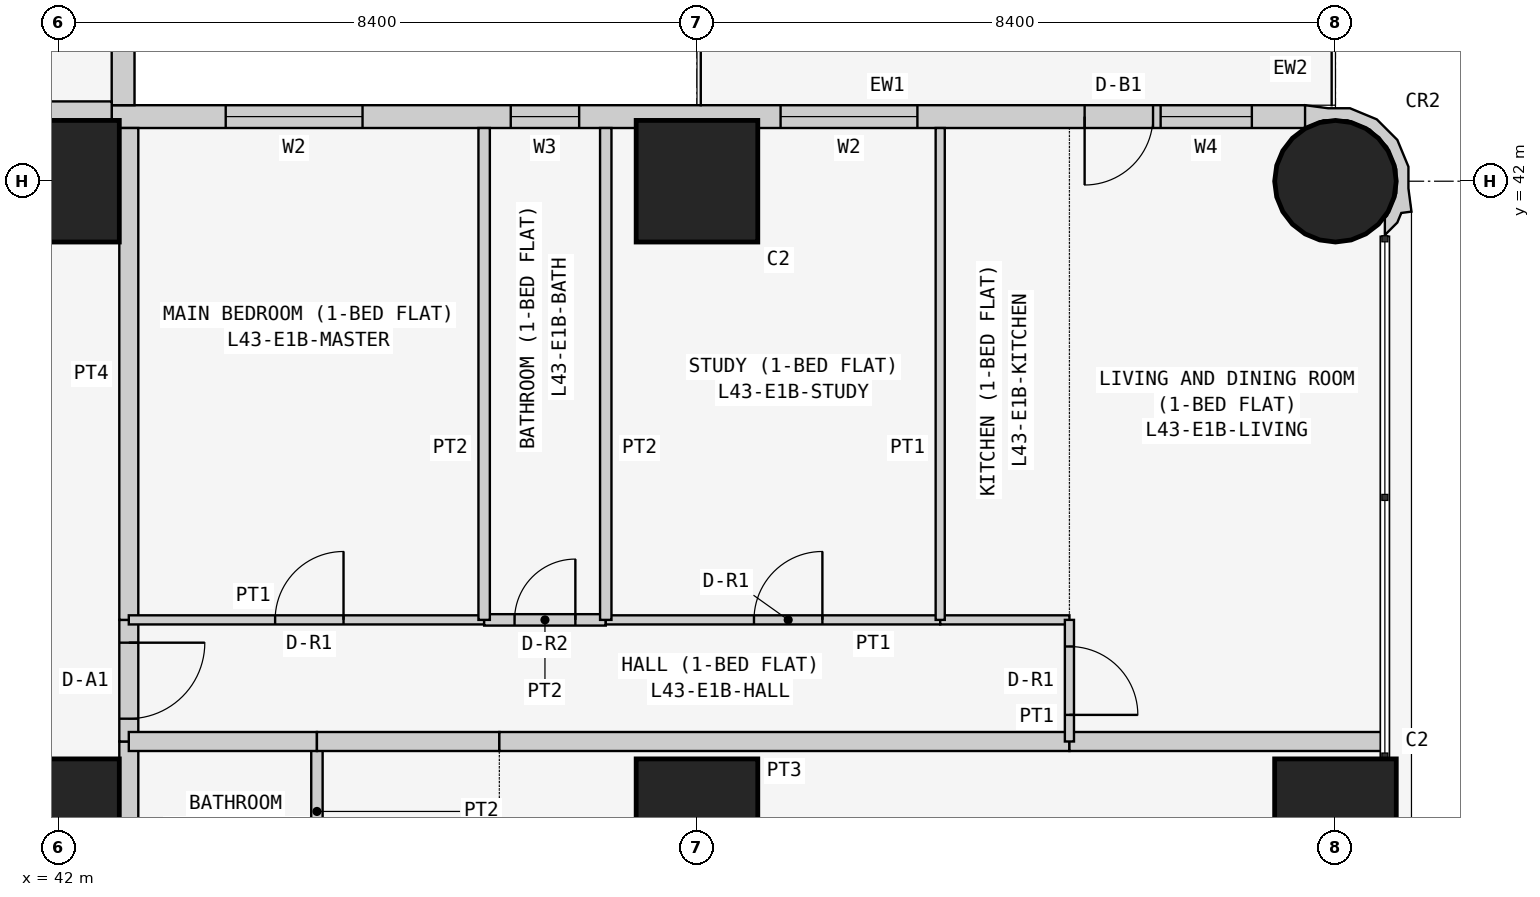
"""IFC4 building model, lengths in metres.
Left out: names, types, materials, properties, quantities, classifications, styles, units other than length and angle.
Written with IfcOpenShell. Run it as: python <this file> out.ifc"""

import sys

from ifc_helpers import new_model, si_unit, direction, frame, frame_2d, origin, origin_2d, place, context, subcontext, project, spatial, polyline, rectangle, circle, outline, extrude, element, fill, save


model = new_model("IFC4")
c1 = context("Model", 3, precision=1e-05, world=origin(), true_north=direction((0.0, 1.0)))
c2 = subcontext(c1, "Body", "Model", "MODEL_VIEW")
j1 = project(units=[si_unit("LENGTHUNIT", "METRE"), si_unit("PLANEANGLEUNIT", "RADIAN")], contexts=[c1])
p1 = place(None, origin())
s1 = spatial("IfcSite", under=j1, at=p1, CompositionType="ELEMENT")
p2 = place(p1, origin())
s2 = spatial("IfcBuilding", under=s1, at=p2, CompositionType="ELEMENT")
p3 = place(p2, frame((0.0, 0.0, 166.5)))
s3 = spatial("IfcBuildingStorey", under=s2, at=p3, CompositionType="ELEMENT", Elevation=166.5)
for number, where, z_axis, x_axis in (
    (1, (42.0, 33.6, 0.0), (0.0, 0.0, 1.0), (1.0, 0.0, 0.0)),
    (2, (42.0, 42.0, 0.0), (0.0, 0.0, 1.0), (1.0, 0.0, 0.0)),
    (3, (50.4, 33.6, 0.0), (0.0, 0.0, 1.0), (1.0, 0.0, 0.0)),
    (4, (50.4, 42.0, 0.0), (0.0, 0.0, 1.0), (1.0, 0.0, 0.0)),
    (5, (58.8, 33.6, 0.0), (0.0, 0.0, 1.0), (1.0, 0.0, 0.0)),
):
    element("IfcColumn", number, at=place(p3, frame(where, z_axis=z_axis, x_axis=x_axis)), inside=s3, PredefinedType="COLUMN", context=c2, shape_type="SweptSolid", body=[
        extrude(rectangle(XDim=1.6, YDim=1.6, at=origin_2d()), origin(), (0.0, 0.0, 1.0), 3.6),
    ])
p4 = place(p3, frame((58.8, 42.0, 0.0), z_axis=(0.0, 0.0, 1.0), x_axis=(1.0, 0.0, 0.0)))
e6 = element("IfcColumn", 6, at=p4, inside=s3, PredefinedType="COLUMN", context=c2, shape_type="SweptSolid", body=[
    extrude(circle(Radius=0.8, at=origin_2d()), origin(), (0.0, 0.0, 1.0), 3.6),
])
p5 = place(p3, frame((58.4, 42.85, 0.0), z_axis=(0.0, 0.0, 1.0), x_axis=(-1.0, 0.0, 0.0)))
e7 = element("IfcWall", 7, at=p5, inside=s3, PredefinedType="SOLIDWALL", context=c2, shape_type="SweptSolid", body=[
    extrude(rectangle(XDim=15.7, YDim=0.3, at=frame_2d((7.85, 0.0))), origin(), (0.0, 0.0, 1.0), 3.45),
])
p6 = place(p5, frame((12.4, 0.0, 0.9)))
e8 = element("IfcOpeningElement", 8, at=p6, cuts=e7, PredefinedType="OPENING", context=c2, shape_type="SweptSolid", body=[
    extrude(rectangle(XDim=1.8, YDim=1.5, at=frame_2d((0.9, 0.75))), frame((0.0, 0.16, 0.0), z_axis=(0.0, -1.0, 0.0), x_axis=(1.0, 0.0, 0.0)), (0.0, 0.0, 1.0), 0.32),
])
p7 = place(p5, frame((9.55, 0.0, 1.5)))
e9 = element("IfcOpeningElement", 9, at=p7, cuts=e7, PredefinedType="OPENING", context=c2, shape_type="SweptSolid", body=[
    extrude(rectangle(XDim=0.9, YDim=0.7, at=frame_2d((0.45, 0.35))), frame((0.0, 0.16, 0.0), z_axis=(0.0, -1.0, 0.0), x_axis=(1.0, 0.0, 0.0)), (0.0, 0.0, 1.0), 0.32),
])
p8 = place(p5, frame((5.1, 0.0, 0.9)))
e10 = element("IfcOpeningElement", 10, at=p8, cuts=e7, PredefinedType="OPENING", context=c2, shape_type="SweptSolid", body=[
    extrude(rectangle(XDim=1.8, YDim=1.5, at=frame_2d((0.9, 0.75))), frame((0.0, 0.16, 0.0), z_axis=(0.0, -1.0, 0.0), x_axis=(1.0, 0.0, 0.0)), (0.0, 0.0, 1.0), 0.32),
])
p9 = place(p5, frame((2.0, 0.0, 0.0)))
e11 = element("IfcOpeningElement", 11, at=p9, cuts=e7, PredefinedType="OPENING", context=c2, shape_type="SweptSolid", body=[
    extrude(rectangle(XDim=0.9, YDim=2.4, at=frame_2d((0.45, 1.2))), frame((0.0, 0.16, 0.0), z_axis=(0.0, -1.0, 0.0), x_axis=(1.0, 0.0, 0.0)), (0.0, 0.0, 1.0), 0.32),
])
p10 = place(p5, frame((0.7, 0.0, 0.9)))
e12 = element("IfcOpeningElement", 12, at=p10, cuts=e7, PredefinedType="OPENING", context=c2, shape_type="SweptSolid", body=[
    extrude(rectangle(XDim=1.2, YDim=1.5, at=frame_2d((0.6, 0.75))), frame((0.0, 0.16, 0.0), z_axis=(0.0, -1.0, 0.0), x_axis=(1.0, 0.0, 0.0)), (0.0, 0.0, 1.0), 0.32),
])
p11 = place(p3, frame((42.85, 43.0, 0.0), z_axis=(0.0, 0.0, 1.0), x_axis=(0.0, 1.0, 0.0)))
e13 = element("IfcWall", 13, at=p11, inside=s3, PredefinedType="SOLIDWALL", context=c2, shape_type="SweptSolid", body=[
    extrude(rectangle(XDim=7.0, YDim=0.3, at=frame_2d((3.5, 0.0))), origin(), (0.0, 0.0, 1.0), 3.45),
])
p12 = place(p11, frame((1.5, 0.0, 0.9)))
e14 = element("IfcOpeningElement", 14, at=p12, cuts=e13, PredefinedType="OPENING", context=c2, shape_type="SweptSolid", body=[
    extrude(rectangle(XDim=2.4, YDim=1.5, at=frame_2d((1.2, 0.75))), frame((0.0, 0.16, 0.0), z_axis=(0.0, -1.0, 0.0), x_axis=(1.0, 0.0, 0.0)), (0.0, 0.0, 1.0), 0.32),
])
p13 = place(p11, frame((5.05, 0.0, 0.9)))
e15 = element("IfcOpeningElement", 15, at=p13, cuts=e13, PredefinedType="OPENING", context=c2, shape_type="SweptSolid", body=[
    extrude(rectangle(XDim=1.2, YDim=1.5, at=frame_2d((0.6, 0.75))), frame((0.0, 0.16, 0.0), z_axis=(0.0, -1.0, 0.0), x_axis=(1.0, 0.0, 0.0)), (0.0, 0.0, 1.0), 0.32),
])
p14 = place(p3, frame((59.395, 41.352, 0.0), z_axis=(0.0, 0.0, 1.0), x_axis=(0.93923434088, 0.343276641956, 0.0)))
e16 = element("IfcWall", 16, at=p14, inside=s3, PredefinedType="SOLIDWALL", context=c2, shape_type="SweptSolid", body=[
    extrude(outline(polyline([(0.532, 0.393), (0.631, 0.663), (0.614, 1.044), (0.453, 1.391), (0.172, 1.649), (-0.097, 1.748), (-0.369, 1.89), (-0.509, 1.621), (-0.491, 1.615), (-0.479, 1.609), (-0.211, 1.62), (0.088, 1.511), (0.323, 1.295), (0.457, 1.006), (0.47, 0.688), (0.361, 0.389), (0.145, 0.154), (0.108, 0.136), (0.031, -0.075), (0.241, 0.023), (0.333, 0.124), (0.465, 0.094), (0.532, 0.393)])), origin(), (0.0, 0.0, 1.0), 3.45),
])
p15 = place(p3, frame((35.829, 42.925, 0.0), z_axis=(0.0, 0.0, 1.0), x_axis=(1.0, 0.0, 0.0)))
e17 = element("IfcWall", 17, at=p15, inside=s3, PredefinedType="PARTITIONING", context=c2, shape_type="SweptSolid", body=[
    extrude(rectangle(XDim=6.871, YDim=0.25, at=frame_2d((3.436, 0.0))), origin(), (0.0, 0.0, 1.0), 3.45),
])
p16 = place(p3, frame((42.925, 34.629, 0.0), z_axis=(0.0, 0.0, 1.0), x_axis=(0.0, -1.0, 0.0)))
e18 = element("IfcWall", 18, at=p16, inside=s3, PredefinedType="PARTITIONING", context=c2, shape_type="SweptSolid", body=[
    extrude(rectangle(XDim=2.629, YDim=0.25, at=frame_2d((1.314, 0.0))), origin(), (0.0, 0.0, 1.0), 3.45),
])
p17 = place(p3, frame((42.925, 36.229, 0.0), z_axis=(0.0, 0.0, 1.0), x_axis=(0.0, -1.0, 0.0)))
e19 = element("IfcWall", 19, at=p17, inside=s3, PredefinedType="PARTITIONING", context=c2, shape_type="SweptSolid", body=[
    extrude(rectangle(XDim=1.6, YDim=0.25, at=frame_2d((0.8, 0.0))), origin(), (0.0, 0.0, 1.0), 3.45),
])
p18 = place(p17, frame((0.3, 0.0, 0.0)))
e20 = element("IfcOpeningElement", 20, at=p18, cuts=e19, PredefinedType="OPENING", context=c2, shape_type="SweptSolid", body=[
    extrude(rectangle(XDim=1.0, YDim=2.1, at=frame_2d((0.5, 1.05))), frame((0.0, 0.135, 0.0), z_axis=(0.0, -1.0, 0.0), x_axis=(1.0, 0.0, 0.0)), (0.0, 0.0, 1.0), 0.27),
])
p19 = place(p3, frame((42.925, 42.7, 0.0), z_axis=(0.0, 0.0, 1.0), x_axis=(0.0, -1.0, 0.0)))
e21 = element("IfcWall", 21, at=p19, inside=s3, PredefinedType="PARTITIONING", context=c2, shape_type="SweptSolid", body=[
    extrude(rectangle(XDim=6.471, YDim=0.25, at=frame_2d((3.235, 0.0))), origin(), (0.0, 0.0, 1.0), 3.45),
])
p20 = place(p3, frame((45.4, 32.0, 0.0), z_axis=(0.0, 0.0, 1.0), x_axis=(0.0, 1.0, 0.0)))
e22 = element("IfcWall", 22, at=p20, inside=s3, PredefinedType="PARTITIONING", context=c2, shape_type="SweptSolid", body=[
    extrude(rectangle(XDim=2.629, YDim=0.15, at=frame_2d((1.314, 0.0))), origin(), (0.0, 0.0, 1.0), 3.45),
])
p21 = place(p3, frame((45.4, 34.629, 0.0), z_axis=(0.0, 0.0, 1.0), x_axis=(-1.0, 0.0, 0.0)))
e23 = element("IfcWall", 23, at=p21, inside=s3, PredefinedType="PARTITIONING", context=c2, shape_type="SweptSolid", body=[
    extrude(rectangle(XDim=2.475, YDim=0.25, at=frame_2d((1.237, 0.0))), origin(), (0.0, 0.0, 1.0), 3.45),
])
p22 = place(p3, frame((47.8, 34.629, 0.0), z_axis=(0.0, 0.0, 1.0), x_axis=(-1.0, 0.0, 0.0)))
e24 = element("IfcWall", 24, at=p22, inside=s3, PredefinedType="PARTITIONING", context=c2, shape_type="SweptSolid", body=[
    extrude(rectangle(XDim=2.4, YDim=0.25, at=frame_2d((1.2, 0.0))), origin(), (0.0, 0.0, 1.0), 3.45),
])
p23 = place(p3, frame((55.3, 34.629, 0.0), z_axis=(0.0, 0.0, 1.0), x_axis=(-1.0, 0.0, 0.0)))
e25 = element("IfcWall", 25, at=p23, inside=s3, PredefinedType="PARTITIONING", context=c2, shape_type="SweptSolid", body=[
    extrude(rectangle(XDim=7.5, YDim=0.25, at=frame_2d((3.75, 0.0))), origin(), (0.0, 0.0, 1.0), 3.45),
])
p24 = place(p3, frame((59.45, 34.629, 0.0), z_axis=(0.0, 0.0, 1.0), x_axis=(-1.0, 0.0, 0.0)))
e26 = element("IfcWall", 26, at=p24, inside=s3, PredefinedType="PARTITIONING", context=c2, shape_type="SweptSolid", body=[
    extrude(rectangle(XDim=4.15, YDim=0.25, at=frame_2d((2.075, 0.0))), origin(), (0.0, 0.0, 1.0), 3.45),
])
p25 = place(p3, frame((47.6, 36.229, 0.0), z_axis=(0.0, 0.0, 1.0), x_axis=(-1.0, 0.0, 0.0)))
e27 = element("IfcWall", 27, at=p25, inside=s3, PredefinedType="PARTITIONING", context=c2, shape_type="SweptSolid", body=[
    extrude(rectangle(XDim=4.675, YDim=0.12, at=frame_2d((2.337, 0.0))), origin(), (0.0, 0.0, 1.0), 3.45),
])
p26 = place(p25, frame((1.85, 0.0, 0.0)))
e28 = element("IfcOpeningElement", 28, at=p26, cuts=e27, PredefinedType="OPENING", context=c2, shape_type="SweptSolid", body=[
    extrude(rectangle(XDim=0.9, YDim=2.1, at=frame_2d((0.45, 1.05))), frame((0.0, 0.07, 0.0), z_axis=(0.0, -1.0, 0.0), x_axis=(1.0, 0.0, 0.0)), (0.0, 0.0, 1.0), 0.14),
])
p27 = place(p3, frame((49.2, 36.229, 0.0), z_axis=(0.0, 0.0, 1.0), x_axis=(-1.0, 0.0, 0.0)))
e29 = element("IfcWall", 29, at=p27, inside=s3, PredefinedType="PARTITIONING", context=c2, shape_type="SweptSolid", body=[
    extrude(rectangle(XDim=1.6, YDim=0.15, at=frame_2d((0.8, 0.0))), origin(), (0.0, 0.0, 1.0), 3.45),
])
p28 = place(p27, frame((0.4, 0.0, 0.0)))
e30 = element("IfcOpeningElement", 30, at=p28, cuts=e29, PredefinedType="OPENING", context=c2, shape_type="SweptSolid", body=[
    extrude(rectangle(XDim=0.8, YDim=2.1, at=frame_2d((0.4, 1.05))), frame((0.0, 0.085, 0.0), z_axis=(0.0, -1.0, 0.0), x_axis=(1.0, 0.0, 0.0)), (0.0, 0.0, 1.0), 0.17),
])
p29 = place(p3, frame((53.6, 36.229, 0.0), z_axis=(0.0, 0.0, 1.0), x_axis=(-1.0, 0.0, 0.0)))
e31 = element("IfcWall", 31, at=p29, inside=s3, PredefinedType="PARTITIONING", context=c2, shape_type="SweptSolid", body=[
    extrude(rectangle(XDim=4.4, YDim=0.12, at=frame_2d((2.2, 0.0))), origin(), (0.0, 0.0, 1.0), 3.45),
])
p30 = place(p29, frame((1.55, 0.0, 0.0)))
e32 = element("IfcOpeningElement", 32, at=p30, cuts=e31, PredefinedType="OPENING", context=c2, shape_type="SweptSolid", body=[
    extrude(rectangle(XDim=0.9, YDim=2.1, at=frame_2d((0.45, 1.05))), frame((0.0, 0.07, 0.0), z_axis=(0.0, -1.0, 0.0), x_axis=(1.0, 0.0, 0.0)), (0.0, 0.0, 1.0), 0.14),
])
p31 = place(p3, frame((55.3, 36.229, 0.0), z_axis=(0.0, 0.0, 1.0), x_axis=(-1.0, 0.0, 0.0)))
e33 = element("IfcWall", 33, at=p31, inside=s3, PredefinedType="PARTITIONING", context=c2, shape_type="SweptSolid", body=[
    extrude(rectangle(XDim=1.7, YDim=0.12, at=frame_2d((0.85, 0.0))), origin(), (0.0, 0.0, 1.0), 3.45),
])
p32 = place(p3, frame((55.3, 34.629, 0.0), z_axis=(0.0, 0.0, 1.0), x_axis=(0.0, 1.0, 0.0)))
e34 = element("IfcWall", 34, at=p32, inside=s3, PredefinedType="PARTITIONING", context=c2, shape_type="SweptSolid", body=[
    extrude(rectangle(XDim=1.6, YDim=0.12, at=frame_2d((0.8, 0.0))), origin(), (0.0, 0.0, 1.0), 3.45),
])
p33 = place(p32, frame((0.35, 0.0, 0.0)))
e35 = element("IfcOpeningElement", 35, at=p33, cuts=e34, PredefinedType="OPENING", context=c2, shape_type="SweptSolid", body=[
    extrude(rectangle(XDim=0.9, YDim=2.1, at=frame_2d((0.45, 1.05))), frame((0.0, 0.07, 0.0), z_axis=(0.0, -1.0, 0.0), x_axis=(1.0, 0.0, 0.0)), (0.0, 0.0, 1.0), 0.14),
])
for number, where, z_axis, x_axis in (
    (36, (47.6, 36.229, 0.0), (0.0, 0.0, 1.0), (0.0, 1.0, 0.0)),
    (37, (49.2, 36.229, 0.0), (0.0, 0.0, 1.0), (0.0, 1.0, 0.0)),
):
    element("IfcWall", number, at=place(p3, frame(where, z_axis=z_axis, x_axis=x_axis)), inside=s3, PredefinedType="PARTITIONING", context=c2, shape_type="SweptSolid", body=[
        extrude(rectangle(XDim=6.471, YDim=0.15, at=frame_2d((3.235, 0.0))), origin(), (0.0, 0.0, 1.0), 3.45),
    ])
p34 = place(p3, frame((53.6, 36.229, 0.0), z_axis=(0.0, 0.0, 1.0), x_axis=(0.0, 1.0, 0.0)))
e38 = element("IfcWall", 38, at=p34, inside=s3, PredefinedType="PARTITIONING", context=c2, shape_type="SweptSolid", body=[
    extrude(rectangle(XDim=6.471, YDim=0.12, at=frame_2d((3.235, 0.0))), origin(), (0.0, 0.0, 1.0), 3.45),
])
p35 = place(p6, origin())
e39 = element("IfcWindow", 39, at=p35, inside=s3, PartitioningType="SINGLE_PANEL", PredefinedType="WINDOW", context=c2, shape_type="SweptSolid", body=[
    extrude(rectangle(XDim=1.8, YDim=1.5, at=frame_2d((0.9, 0.75))), frame((0.0, 0.03, 0.0), z_axis=(0.0, -1.0, 0.0), x_axis=(1.0, 0.0, 0.0)), (0.0, 0.0, 1.0), 0.06),
])
fill(e8, e39)
p36 = place(p7, origin())
e40 = element("IfcWindow", 40, at=p36, inside=s3, PartitioningType="SINGLE_PANEL", PredefinedType="WINDOW", context=c2, shape_type="SweptSolid", body=[
    extrude(rectangle(XDim=0.9, YDim=0.7, at=frame_2d((0.45, 0.35))), frame((0.0, 0.03, 0.0), z_axis=(0.0, -1.0, 0.0), x_axis=(1.0, 0.0, 0.0)), (0.0, 0.0, 1.0), 0.06),
])
fill(e9, e40)
p37 = place(p8, origin())
e41 = element("IfcWindow", 41, at=p37, inside=s3, PartitioningType="SINGLE_PANEL", PredefinedType="WINDOW", context=c2, shape_type="SweptSolid", body=[
    extrude(rectangle(XDim=1.8, YDim=1.5, at=frame_2d((0.9, 0.75))), frame((0.0, 0.03, 0.0), z_axis=(0.0, -1.0, 0.0), x_axis=(1.0, 0.0, 0.0)), (0.0, 0.0, 1.0), 0.06),
])
fill(e10, e41)
p38 = place(p9, origin())
e42 = element("IfcDoor", 42, at=p38, inside=s3, OperationType="SINGLE_SWING_RIGHT", PredefinedType="DOOR", context=c2, shape_type="SweptSolid", body=[
    extrude(rectangle(XDim=0.9, YDim=2.4, at=frame_2d((0.45, 1.2))), frame((0.0, 0.025, 0.0), z_axis=(0.0, -1.0, 0.0), x_axis=(1.0, 0.0, 0.0)), (0.0, 0.0, 1.0), 0.05),
])
fill(e11, e42)
p39 = place(p10, origin())
e43 = element("IfcWindow", 43, at=p39, inside=s3, PartitioningType="SINGLE_PANEL", PredefinedType="WINDOW", context=c2, shape_type="SweptSolid", body=[
    extrude(rectangle(XDim=1.2, YDim=1.5, at=frame_2d((0.6, 0.75))), frame((0.0, 0.03, 0.0), z_axis=(0.0, -1.0, 0.0), x_axis=(1.0, 0.0, 0.0)), (0.0, 0.0, 1.0), 0.06),
])
fill(e12, e43)
p40 = place(p18, origin())
e44 = element("IfcDoor", 44, at=p40, inside=s3, OperationType="SINGLE_SWING_LEFT", PredefinedType="DOOR", context=c2, shape_type="SweptSolid", body=[
    extrude(rectangle(XDim=1.0, YDim=2.1, at=frame_2d((0.5, 1.05))), frame((0.0, 0.025, 0.0), z_axis=(0.0, -1.0, 0.0), x_axis=(1.0, 0.0, 0.0)), (0.0, 0.0, 1.0), 0.05),
])
fill(e20, e44)
p41 = place(p26, frame((0.9, 0.0, 0.0), z_axis=(0.0, 0.0, 1.0), x_axis=(-1.0, 0.0, 0.0)))
e45 = element("IfcDoor", 45, at=p41, inside=s3, OperationType="SINGLE_SWING_RIGHT", PredefinedType="DOOR", context=c2, shape_type="SweptSolid", body=[
    extrude(rectangle(XDim=0.9, YDim=2.1, at=frame_2d((0.45, 1.05))), frame((0.0, 0.025, 0.0), z_axis=(0.0, -1.0, 0.0), x_axis=(1.0, 0.0, 0.0)), (0.0, 0.0, 1.0), 0.05),
])
fill(e28, e45)
p42 = place(p28, frame((0.8, 0.0, 0.0), z_axis=(0.0, 0.0, 1.0), x_axis=(-1.0, 0.0, 0.0)))
e46 = element("IfcDoor", 46, at=p42, inside=s3, OperationType="SINGLE_SWING_RIGHT", PredefinedType="DOOR", context=c2, shape_type="SweptSolid", body=[
    extrude(rectangle(XDim=0.8, YDim=2.1, at=frame_2d((0.4, 1.05))), frame((0.0, 0.025, 0.0), z_axis=(0.0, -1.0, 0.0), x_axis=(1.0, 0.0, 0.0)), (0.0, 0.0, 1.0), 0.05),
])
fill(e30, e46)
p43 = place(p30, frame((0.9, 0.0, 0.0), z_axis=(0.0, 0.0, 1.0), x_axis=(-1.0, 0.0, 0.0)))
e47 = element("IfcDoor", 47, at=p43, inside=s3, OperationType="SINGLE_SWING_RIGHT", PredefinedType="DOOR", context=c2, shape_type="SweptSolid", body=[
    extrude(rectangle(XDim=0.9, YDim=2.1, at=frame_2d((0.45, 1.05))), frame((0.0, 0.025, 0.0), z_axis=(0.0, -1.0, 0.0), x_axis=(1.0, 0.0, 0.0)), (0.0, 0.0, 1.0), 0.05),
])
fill(e32, e47)
p44 = place(p33, frame((0.9, 0.0, 0.0), z_axis=(0.0, 0.0, 1.0), x_axis=(-1.0, 0.0, 0.0)))
e48 = element("IfcDoor", 48, at=p44, inside=s3, OperationType="SINGLE_SWING_RIGHT", PredefinedType="DOOR", context=c2, shape_type="SweptSolid", body=[
    extrude(rectangle(XDim=0.9, YDim=2.1, at=frame_2d((0.45, 1.05))), frame((0.0, 0.025, 0.0), z_axis=(0.0, -1.0, 0.0), x_axis=(1.0, 0.0, 0.0)), (0.0, 0.0, 1.0), 0.05),
])
fill(e35, e48)
save(model, sys.argv[1])
